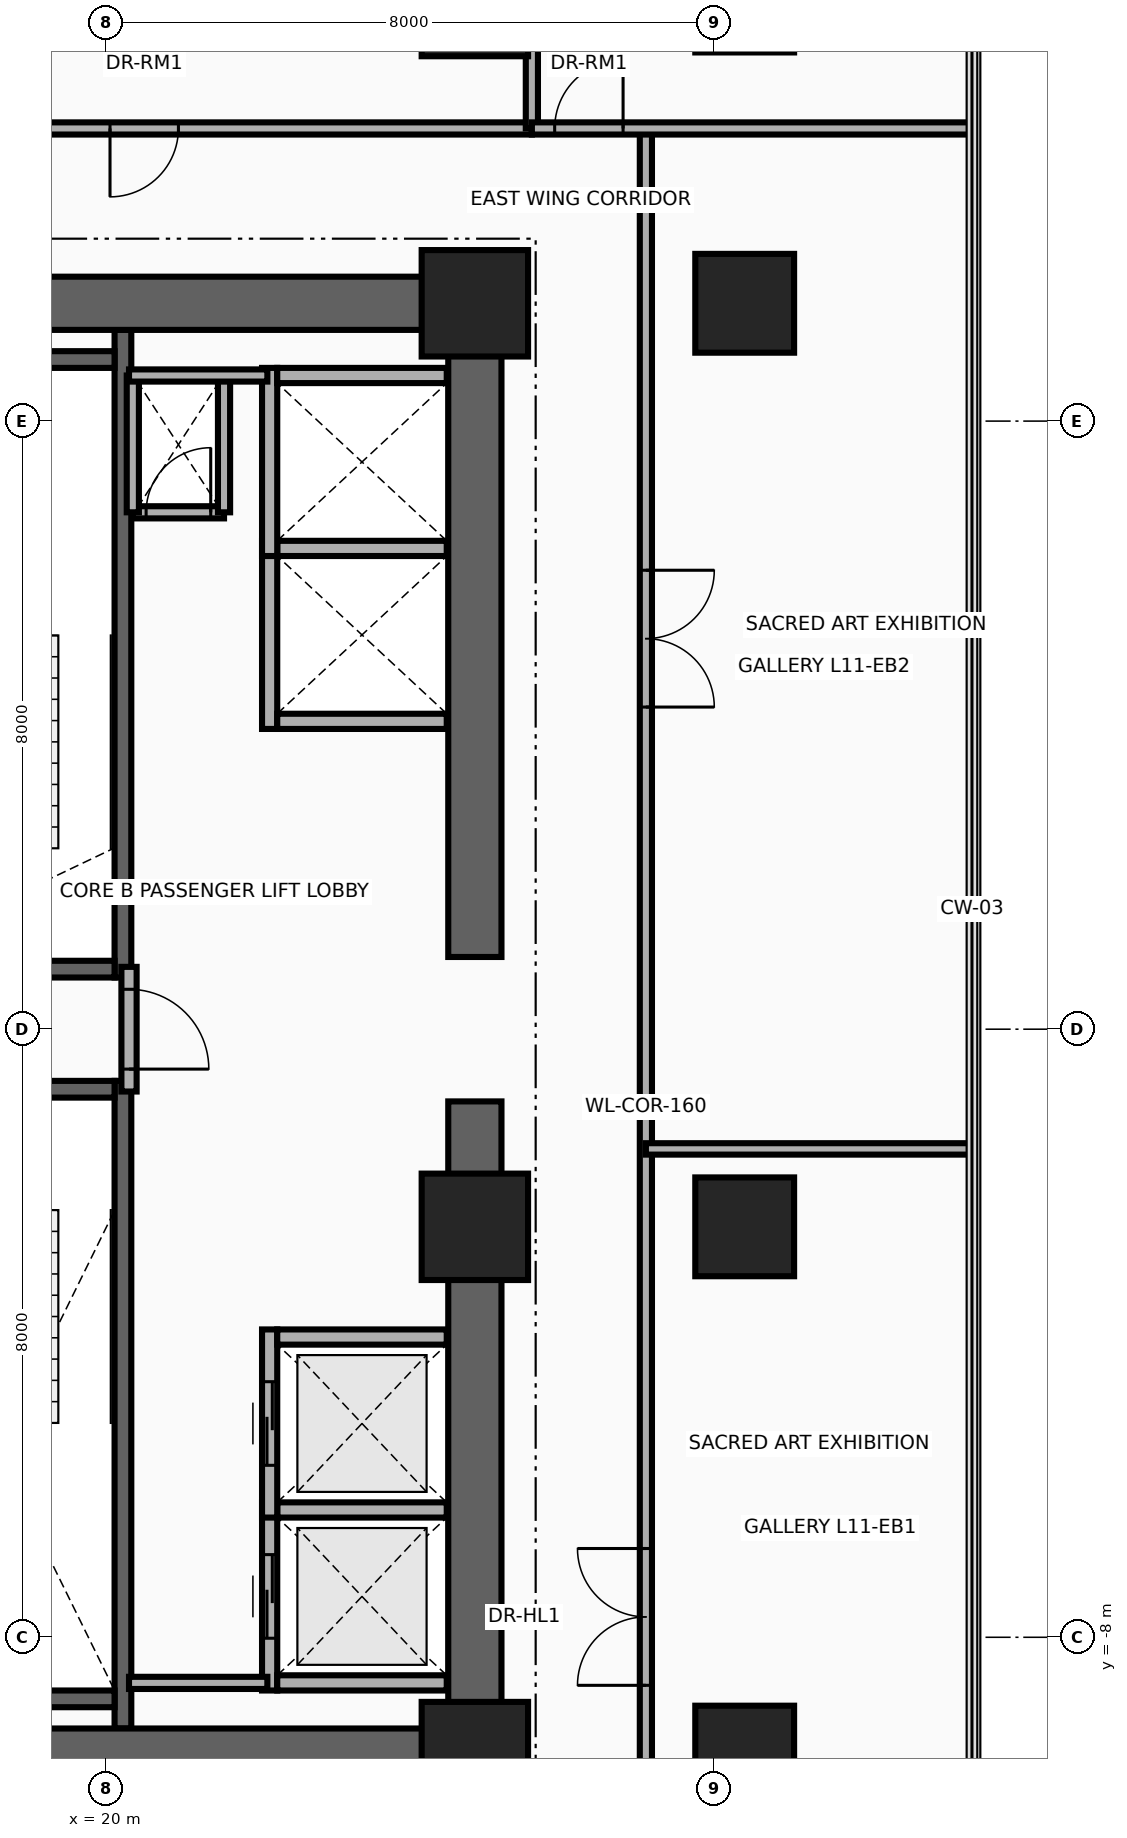
"""IFC4 building model, lengths in metres.
Left out: names, types, materials, properties, quantities, classifications, styles, units other than length and angle.
Written with IfcOpenShell. Run it as: python <this file> out.ifc"""

import sys

from ifc_helpers import new_model, si_unit, direction, frame, frame_2d, origin, origin_2d, place, context, subcontext, project, spatial, rectangle, circle, extrude, source, transform, mapped, element, fill, save


model = new_model("IFC4")
c1 = context("Model", 3, precision=1e-05, world=origin(), true_north=direction((0.0, 1.0)))
c2 = subcontext(c1, "Body", "Model", "MODEL_VIEW")
j1 = project(units=[si_unit("LENGTHUNIT", "METRE"), si_unit("PLANEANGLEUNIT", "RADIAN")], contexts=[c1])
p1 = place(None, origin())
s1 = spatial("IfcSite", under=j1, at=p1, CompositionType="ELEMENT")
p2 = place(p1, origin())
s2 = spatial("IfcBuilding", under=s1, at=p2, CompositionType="ELEMENT")
p3 = place(p2, frame((0.0, 0.0, 48.2)))
s3 = spatial("IfcBuildingStorey", under=s2, at=p3, CompositionType="ELEMENT", Elevation=48.2)
p4 = place(p3, frame((20.22, 0.68, 0.0), z_axis=(0.0, 0.0, 1.0), x_axis=(0.0, 1.0, 0.0)))
e1 = element("IfcWall", 1, at=p4, inside=s3, PredefinedType="SHEAR", context=c2, shape_type="SweptSolid", body=[
    extrude(rectangle(XDim=8.52, YDim=0.22, at=frame_2d((4.26, 0.0))), origin(), (0.0, 0.0, 1.0), 3.46),
])
p5 = place(p3, frame((17.0, 0.79, 0.0), z_axis=(0.0, 0.0, 1.0), x_axis=(1.0, 0.0, 0.0)))
e2 = element("IfcWall", 2, at=p5, inside=s3, PredefinedType="SHEAR", context=c2, shape_type="SweptSolid", body=[
    extrude(rectangle(XDim=3.11, YDim=0.22, at=frame_2d((1.555, 0.0))), origin(), (0.0, 0.0, 1.0), 3.46),
])
p6 = place(p5, frame((0.95, 0.0, 0.0)))
e3 = element("IfcOpeningElement", 3, at=p6, cuts=e2, PredefinedType="OPENING", context=c2, shape_type="SweptSolid", body=[
    extrude(rectangle(XDim=1.1, YDim=2.15, at=frame_2d((0.55, 1.075))), frame((0.0, 0.125, 0.0), z_axis=(0.0, -1.0, 0.0), x_axis=(1.0, 0.0, 0.0)), (0.0, 0.0, 1.0), 0.25),
])
p7 = place(p3, frame((17.0, 8.81, 0.0), z_axis=(0.0, 0.0, 1.0), x_axis=(1.0, 0.0, 0.0)))
e4 = element("IfcWall", 4, at=p7, inside=s3, PredefinedType="SHEAR", context=c2, shape_type="SweptSolid", body=[
    extrude(rectangle(XDim=3.11, YDim=0.22, at=frame_2d((1.555, 0.0))), origin(), (0.0, 0.0, 1.0), 3.46),
])
p8 = place(p3, frame((20.22, -9.2, 0.0), z_axis=(0.0, 0.0, 1.0), x_axis=(0.0, 1.0, 0.0)))
e5 = element("IfcWall", 5, at=p8, inside=s3, PredefinedType="SHEAR", context=c2, shape_type="SweptSolid", body=[
    extrude(rectangle(XDim=8.52, YDim=0.22, at=frame_2d((4.26, 0.0))), origin(), (0.0, 0.0, 1.0), 3.46),
])
p9 = place(p3, frame((17.0, -8.81, 0.0), z_axis=(0.0, 0.0, 1.0), x_axis=(1.0, 0.0, 0.0)))
e6 = element("IfcWall", 6, at=p9, inside=s3, PredefinedType="SHEAR", context=c2, shape_type="SweptSolid", body=[
    extrude(rectangle(XDim=3.11, YDim=0.22, at=frame_2d((1.555, 0.0))), origin(), (0.0, 0.0, 1.0), 3.46),
])
p10 = place(p3, frame((17.0, -0.79, 0.0), z_axis=(0.0, 0.0, 1.0), x_axis=(1.0, 0.0, 0.0)))
e7 = element("IfcWall", 7, at=p10, inside=s3, PredefinedType="SHEAR", context=c2, shape_type="SweptSolid", body=[
    extrude(rectangle(XDim=3.11, YDim=0.22, at=frame_2d((1.555, 0.0))), origin(), (0.0, 0.0, 1.0), 3.46),
])
p11 = place(p10, frame((0.95, 0.0, 0.0)))
e8 = element("IfcOpeningElement", 8, at=p11, cuts=e7, PredefinedType="OPENING", context=c2, shape_type="SweptSolid", body=[
    extrude(rectangle(XDim=1.1, YDim=2.15, at=frame_2d((0.55, 1.075))), frame((0.0, 0.125, 0.0), z_axis=(0.0, -1.0, 0.0), x_axis=(1.0, 0.0, 0.0)), (0.0, 0.0, 1.0), 0.25),
])
for number, where, z_axis, x_axis in (
    (9, (24.85, -9.9, 0.0), (0.0, 0.0, 1.0), (0.0, 1.0, 0.0)),
    (10, (24.85, 0.95, 0.0), (0.0, 0.0, 1.0), (0.0, 1.0, 0.0)),
):
    element("IfcWall", number, at=place(p3, frame(where, z_axis=z_axis, x_axis=x_axis)), inside=s3, PredefinedType="SHEAR", context=c2, shape_type="SweptSolid", body=[
        extrude(rectangle(XDim=8.95, YDim=0.7, at=frame_2d((4.475, 0.0))), origin(), (0.0, 0.0, 1.0), 3.46),
    ])
for number, where, z_axis, x_axis in (
    (11, (15.85, 9.55, 0.0), (0.0, 0.0, 1.0), (1.0, 0.0, 0.0)),
    (12, (15.85, -9.55, 0.0), (0.0, 0.0, 1.0), (1.0, 0.0, 0.0)),
):
    element("IfcWall", number, at=place(p3, frame(where, z_axis=z_axis, x_axis=x_axis)), inside=s3, PredefinedType="SHEAR", context=c2, shape_type="SweptSolid", body=[
        extrude(rectangle(XDim=9.0, YDim=0.7, at=frame_2d((4.5, 0.0))), origin(), (0.0, 0.0, 1.0), 3.46),
    ])
m1 = source(origin(), c2, "Body", "SweptSolid", [
    extrude(rectangle(XDim=1.4, YDim=1.4, at=origin_2d()), origin(), (0.0, 0.0, 1.0), 3.7),
])
p12 = place(p3, frame((24.85, -9.55, 0.0), z_axis=(0.0, 0.0, 1.0), x_axis=(1.0, 0.0, 0.0)))
e13 = element("IfcColumn", 13, at=p12, inside=s3, PredefinedType="COLUMN", context=c2, shape_type="MappedRepresentation", body=[
    mapped(m1, transform((0.0, 0.0, 0.0), x_axis=(1.0, 0.0, 0.0), y_axis=(0.0, 1.0, 0.0), z_axis=(0.0, 0.0, 1.0), scale=1.0)),
])
m2 = source(origin(), c2, "Body", "SweptSolid", [
    extrude(circle(Radius=0.65, at=origin_2d()), origin(), (0.0, 0.0, 1.0), 3.7),
])
p13 = place(p3, frame((28.4, -9.55, 0.0), z_axis=(0.0, 0.0, 1.0), x_axis=(1.0, 0.0, 0.0)))
e14 = element("IfcColumn", 14, at=p13, inside=s3, PredefinedType="COLUMN", context=c2, shape_type="MappedRepresentation", body=[
    mapped(m2, transform((0.0, 0.0, 0.0), x_axis=(1.0, 0.0, 0.0), y_axis=(0.0, 1.0, 0.0), z_axis=(0.0, 0.0, 1.0), scale=1.0)),
])
p14 = place(p3, frame((24.85, -2.6, 0.0), z_axis=(0.0, 0.0, 1.0), x_axis=(1.0, 0.0, 0.0)))
e15 = element("IfcColumn", 15, at=p14, inside=s3, PredefinedType="COLUMN", context=c2, shape_type="MappedRepresentation", body=[
    mapped(m1, transform((0.0, 0.0, 0.0), x_axis=(1.0, 0.0, 0.0), y_axis=(0.0, 1.0, 0.0), z_axis=(0.0, 0.0, 1.0), scale=1.0)),
])
p15 = place(p3, frame((28.4, -2.6, 0.0), z_axis=(0.0, 0.0, 1.0), x_axis=(1.0, 0.0, 0.0)))
e16 = element("IfcColumn", 16, at=p15, inside=s3, PredefinedType="COLUMN", context=c2, shape_type="MappedRepresentation", body=[
    mapped(m2, transform((0.0, 0.0, 0.0), x_axis=(1.0, 0.0, 0.0), y_axis=(0.0, 1.0, 0.0), z_axis=(0.0, 0.0, 1.0), scale=1.0)),
])
p16 = place(p3, frame((24.85, 9.55, 0.0), z_axis=(0.0, 0.0, 1.0), x_axis=(1.0, 0.0, 0.0)))
e17 = element("IfcColumn", 17, at=p16, inside=s3, PredefinedType="COLUMN", context=c2, shape_type="MappedRepresentation", body=[
    mapped(m1, transform((0.0, 0.0, 0.0), x_axis=(1.0, 0.0, 0.0), y_axis=(0.0, 1.0, 0.0), z_axis=(0.0, 0.0, 1.0), scale=1.0)),
])
p17 = place(p3, frame((28.4, 9.55, 0.0), z_axis=(0.0, 0.0, 1.0), x_axis=(1.0, 0.0, 0.0)))
e18 = element("IfcColumn", 18, at=p17, inside=s3, PredefinedType="COLUMN", context=c2, shape_type="MappedRepresentation", body=[
    mapped(m2, transform((0.0, 0.0, 0.0), x_axis=(1.0, 0.0, 0.0), y_axis=(0.0, 1.0, 0.0), z_axis=(0.0, 0.0, 1.0), scale=1.0)),
])
p18 = place(p3, frame((24.85, 13.5, 0.0), z_axis=(0.0, 0.0, 1.0), x_axis=(1.0, 0.0, 0.0)))
e19 = element("IfcColumn", 19, at=p18, inside=s3, PredefinedType="COLUMN", context=c2, shape_type="MappedRepresentation", body=[
    mapped(m1, transform((0.0, 0.0, 0.0), x_axis=(1.0, 0.0, 0.0), y_axis=(0.0, 1.0, 0.0), z_axis=(0.0, 0.0, 1.0), scale=1.0)),
])
p19 = place(p3, frame((22.15, -8.7, 0.0), z_axis=(0.0, 0.0, 1.0), x_axis=(0.0, 1.0, 0.0)))
e20 = element("IfcWall", 20, at=p19, inside=s3, PredefinedType="MOVABLE", context=c2, shape_type="SweptSolid", body=[
    extrude(rectangle(XDim=2.475, YDim=0.2, at=frame_2d((1.237, 0.0))), origin(), (0.0, 0.0, 1.0), 3.46),
])
p20 = place(p19, frame((0.688, 0.0, 0.0)))
e21 = element("IfcOpeningElement", 21, at=p20, cuts=e20, PredefinedType="OPENING", context=c2, shape_type="SweptSolid", body=[
    extrude(rectangle(XDim=1.1, YDim=2.1, at=frame_2d((0.55, 1.05))), frame((0.0, 0.115, 0.0), z_axis=(0.0, -1.0, 0.0), x_axis=(1.0, 0.0, 0.0)), (0.0, 0.0, 1.0), 0.23),
])
for number, where, z_axis, x_axis in (
    (22, (22.25, -8.6, 0.0), (0.0, 0.0, 1.0), (1.0, 0.0, 0.0)),
    (23, (22.25, -6.325, 0.0), (0.0, 0.0, 1.0), (1.0, 0.0, 0.0)),
):
    element("IfcWall", number, at=place(p3, frame(where, z_axis=z_axis, x_axis=x_axis)), inside=s3, PredefinedType="MOVABLE", context=c2, shape_type="SweptSolid", body=[
        extrude(rectangle(XDim=2.23, YDim=0.2, at=frame_2d((1.115, 0.0))), origin(), (0.0, 0.0, 1.0), 3.46),
    ])
p21 = place(p3, frame((22.15, -6.425, 0.0), z_axis=(0.0, 0.0, 1.0), x_axis=(0.0, 1.0, 0.0)))
e24 = element("IfcWall", 24, at=p21, inside=s3, PredefinedType="MOVABLE", context=c2, shape_type="SweptSolid", body=[
    extrude(rectangle(XDim=2.475, YDim=0.2, at=frame_2d((1.238, 0.0))), origin(), (0.0, 0.0, 1.0), 3.46),
])
p22 = place(p21, frame((0.688, 0.0, 0.0)))
e25 = element("IfcOpeningElement", 25, at=p22, cuts=e24, PredefinedType="OPENING", context=c2, shape_type="SweptSolid", body=[
    extrude(rectangle(XDim=1.1, YDim=2.1, at=frame_2d((0.55, 1.05))), frame((0.0, 0.115, 0.0), z_axis=(0.0, -1.0, 0.0), x_axis=(1.0, 0.0, 0.0)), (0.0, 0.0, 1.0), 0.23),
])
p23 = place(p3, frame((22.25, -4.05, 0.0), z_axis=(0.0, 0.0, 1.0), x_axis=(1.0, 0.0, 0.0)))
e26 = element("IfcWall", 26, at=p23, inside=s3, PredefinedType="MOVABLE", context=c2, shape_type="SweptSolid", body=[
    extrude(rectangle(XDim=2.23, YDim=0.2, at=frame_2d((1.115, 0.0))), origin(), (0.0, 0.0, 1.0), 3.46),
])
p24 = place(p3, frame((22.15, 3.95, 0.0), z_axis=(0.0, 0.0, 1.0), x_axis=(0.0, 1.0, 0.0)))
e27 = element("IfcWall", 27, at=p24, inside=s3, PredefinedType="MOVABLE", context=c2, shape_type="SweptSolid", body=[
    extrude(rectangle(XDim=2.475, YDim=0.2, at=frame_2d((1.238, 0.0))), origin(), (0.0, 0.0, 1.0), 3.46),
])
for number, where, z_axis, x_axis in (
    (28, (22.25, 4.05, 0.0), (0.0, 0.0, 1.0), (1.0, 0.0, 0.0)),
    (29, (22.25, 6.325, 0.0), (0.0, 0.0, 1.0), (1.0, 0.0, 0.0)),
):
    element("IfcWall", number, at=place(p3, frame(where, z_axis=z_axis, x_axis=x_axis)), inside=s3, PredefinedType="MOVABLE", context=c2, shape_type="SweptSolid", body=[
        extrude(rectangle(XDim=2.23, YDim=0.2, at=frame_2d((1.115, 0.0))), origin(), (0.0, 0.0, 1.0), 2.245),
    ])
p25 = place(p3, frame((22.15, 6.225, 0.0), z_axis=(0.0, 0.0, 1.0), x_axis=(0.0, 1.0, 0.0)))
e30 = element("IfcWall", 30, at=p25, inside=s3, PredefinedType="MOVABLE", context=c2, shape_type="SweptSolid", body=[
    extrude(rectangle(XDim=2.475, YDim=0.2, at=frame_2d((1.237, 0.0))), origin(), (0.0, 0.0, 1.0), 3.46),
])
p26 = place(p3, frame((22.25, 8.6, 0.0), z_axis=(0.0, 0.0, 1.0), x_axis=(1.0, 0.0, 0.0)))
e31 = element("IfcWall", 31, at=p26, inside=s3, PredefinedType="MOVABLE", context=c2, shape_type="SweptSolid", body=[
    extrude(rectangle(XDim=2.23, YDim=0.2, at=frame_2d((1.115, 0.0))), origin(), (0.0, 0.0, 1.0), 2.245),
])
p27 = place(p3, frame((20.3, -0.82, 0.0), z_axis=(0.0, 0.0, 1.0), x_axis=(0.0, 1.0, 0.0)))
e32 = element("IfcWall", 32, at=p27, inside=s3, PredefinedType="PARTITIONING", context=c2, shape_type="SweptSolid", body=[
    extrude(rectangle(XDim=1.64, YDim=0.2, at=frame_2d((0.82, 0.0))), origin(), (0.0, 0.0, 1.0), 3.46),
])
p28 = place(p27, frame((0.295, 0.0, 0.0)))
e33 = element("IfcOpeningElement", 33, at=p28, cuts=e32, PredefinedType="OPENING", context=c2, shape_type="SweptSolid", body=[
    extrude(rectangle(XDim=1.05, YDim=2.15, at=frame_2d((0.525, 1.075))), frame((0.0, 0.115, 0.0), z_axis=(0.0, -1.0, 0.0), x_axis=(1.0, 0.0, 0.0)), (0.0, 0.0, 1.0), 0.23),
])
p29 = place(p3, frame((20.35, 6.8, 0.0), z_axis=(0.0, 0.0, 1.0), x_axis=(1.0, 0.0, 0.0)))
e34 = element("IfcWall", 34, at=p29, inside=s3, PredefinedType="PARTITIONING", context=c2, shape_type="SweptSolid", body=[
    extrude(rectangle(XDim=1.2, YDim=0.16, at=frame_2d((0.6, 0.0))), origin(), (0.0, 0.0, 1.0), 3.46),
])
p30 = place(p29, frame((0.175, 0.0, 0.0)))
e35 = element("IfcOpeningElement", 35, at=p30, cuts=e34, PredefinedType="OPENING", context=c2, shape_type="SweptSolid", body=[
    extrude(rectangle(XDim=0.85, YDim=2.05, at=frame_2d((0.425, 1.025))), frame((0.0, 0.095, 0.0), z_axis=(0.0, -1.0, 0.0), x_axis=(1.0, 0.0, 0.0)), (0.0, 0.0, 1.0), 0.19),
])
for number, where, z_axis, x_axis in (
    (36, (21.55, 6.8, 0.0), (0.0, 0.0, 1.0), (0.0, 1.0, 0.0)),
    (37, (20.35, 6.8, 0.0), (0.0, 0.0, 1.0), (0.0, 1.0, 0.0)),
):
    element("IfcWall", number, at=place(p3, frame(where, z_axis=z_axis, x_axis=x_axis)), inside=s3, PredefinedType="PARTITIONING", context=c2, shape_type="SweptSolid", body=[
        extrude(rectangle(XDim=1.8, YDim=0.16, at=frame_2d((0.9, 0.0))), origin(), (0.0, 0.0, 1.0), 3.46),
    ])
for number, where, z_axis, x_axis in (
    (38, (20.3, -8.6, 0.0), (0.0, 0.0, 1.0), (1.0, 0.0, 0.0)),
    (39, (20.3, 8.6, 0.0), (0.0, 0.0, 1.0), (1.0, 0.0, 0.0)),
):
    element("IfcWall", number, at=place(p3, frame(where, z_axis=z_axis, x_axis=x_axis)), inside=s3, PredefinedType="PARTITIONING", context=c2, shape_type="SweptSolid", body=[
        extrude(rectangle(XDim=1.82, YDim=0.16, at=frame_2d((0.91, 0.0))), origin(), (0.0, 0.0, 1.0), 3.46),
    ])
p31 = place(p3, frame((15.4, 11.85, 0.0), z_axis=(0.0, 0.0, 1.0), x_axis=(1.0, 0.0, 0.0)))
e40 = element("IfcWall", 40, at=p31, inside=s3, PredefinedType="PARTITIONING", context=c2, shape_type="SweptSolid", body=[
    extrude(rectangle(XDim=10.2, YDim=0.16, at=frame_2d((5.1, 0.0))), origin(), (0.0, 0.0, 1.0), 2.834),
])
p32 = place(p31, frame((4.65, 0.0, 0.0)))
e41 = element("IfcOpeningElement", 41, at=p32, cuts=e40, PredefinedType="OPENING", context=c2, shape_type="SweptSolid", body=[
    extrude(rectangle(XDim=0.9, YDim=2.1, at=frame_2d((0.45, 1.05))), frame((0.0, 0.095, 0.0), z_axis=(0.0, -1.0, 0.0), x_axis=(1.0, 0.0, 0.0)), (0.0, 0.0, 1.0), 0.19),
])
p33 = place(p3, frame((25.6, 11.85, 0.0), z_axis=(0.0, 0.0, 1.0), x_axis=(0.0, 1.0, 0.0)))
e42 = element("IfcWall", 42, at=p33, inside=s3, PredefinedType="PARTITIONING", context=c2, shape_type="SweptSolid", body=[
    extrude(rectangle(XDim=5.898, YDim=0.16, at=frame_2d((2.949, 0.0))), origin(), (0.0, 0.0, 1.0), 2.583),
])
p34 = place(p3, frame((27.1, -13.89, 0.0), z_axis=(0.0, 0.0, 1.0), x_axis=(0.0, 1.0, 0.0)))
e43 = element("IfcWall", 43, at=p34, inside=s3, PredefinedType="PARTITIONING", context=c2, shape_type="SweptSolid", body=[
    extrude(rectangle(XDim=25.74, YDim=0.16, at=frame_2d((12.87, 0.0))), origin(), (0.0, 0.0, 1.0), 2.583),
])
p35 = place(p34, frame((5.258, 0.0, 0.0)))
e44 = element("IfcOpeningElement", 44, at=p35, cuts=e43, PredefinedType="OPENING", context=c2, shape_type="SweptSolid", body=[
    extrude(rectangle(XDim=1.8, YDim=2.15, at=frame_2d((0.9, 1.075))), frame((0.0, 0.095, 0.0), z_axis=(0.0, -1.0, 0.0), x_axis=(1.0, 0.0, 0.0)), (0.0, 0.0, 1.0), 0.19),
])
p36 = place(p34, frame((18.128, 0.0, 0.0)))
e45 = element("IfcOpeningElement", 45, at=p36, cuts=e43, PredefinedType="OPENING", context=c2, shape_type="SweptSolid", body=[
    extrude(rectangle(XDim=1.8, YDim=2.15, at=frame_2d((0.9, 1.075))), frame((0.0, 0.095, 0.0), z_axis=(0.0, -1.0, 0.0), x_axis=(1.0, 0.0, 0.0)), (0.0, 0.0, 1.0), 0.19),
])
p37 = place(p3, frame((25.6, 11.85, 0.0), z_axis=(0.0, 0.0, 1.0), x_axis=(1.0, 0.0, 0.0)))
e46 = element("IfcWall", 46, at=p37, inside=s3, PredefinedType="PARTITIONING", context=c2, shape_type="SweptSolid", body=[
    extrude(rectangle(XDim=5.79, YDim=0.16, at=frame_2d((2.895, 0.0))), origin(), (0.0, 0.0, 1.0), 2.896),
])
p38 = place(p37, frame((0.3, 0.0, 0.0)))
e47 = element("IfcOpeningElement", 47, at=p38, cuts=e46, PredefinedType="OPENING", context=c2, shape_type="SweptSolid", body=[
    extrude(rectangle(XDim=0.9, YDim=2.1, at=frame_2d((0.45, 1.05))), frame((0.0, 0.095, 0.0), z_axis=(0.0, -1.0, 0.0), x_axis=(1.0, 0.0, 0.0)), (0.0, 0.0, 1.0), 0.19),
])
p39 = place(p3, frame((27.1, -1.575, 0.0), z_axis=(0.0, 0.0, 1.0), x_axis=(1.0, 0.0, 0.0)))
e48 = element("IfcWall", 48, at=p39, inside=s3, PredefinedType="PARTITIONING", context=c2, shape_type="SweptSolid", body=[
    extrude(rectangle(XDim=4.29, YDim=0.15, at=frame_2d((2.145, 0.0))), origin(), (0.0, 0.0, 1.0), 2.896),
])
p40 = place(p20, origin())
e49 = element("IfcDoor", 49, at=p40, inside=s3, OperationType="DOUBLE_DOOR_SLIDING", PredefinedType="DOOR", context=c2, shape_type="SweptSolid", body=[
    extrude(rectangle(XDim=1.1, YDim=2.1, at=frame_2d((0.55, 1.05))), frame((0.0, 0.025, 0.0), z_axis=(0.0, -1.0, 0.0), x_axis=(1.0, 0.0, 0.0)), (0.0, 0.0, 1.0), 0.05),
])
fill(e21, e49)
p41 = place(p22, origin())
e50 = element("IfcDoor", 50, at=p41, inside=s3, OperationType="DOUBLE_DOOR_SLIDING", PredefinedType="DOOR", context=c2, shape_type="SweptSolid", body=[
    extrude(rectangle(XDim=1.1, YDim=2.1, at=frame_2d((0.55, 1.05))), frame((0.0, 0.025, 0.0), z_axis=(0.0, -1.0, 0.0), x_axis=(1.0, 0.0, 0.0)), (0.0, 0.0, 1.0), 0.05),
])
fill(e25, e50)
p42 = place(p28, frame((1.05, 0.0, 0.0), z_axis=(0.0, 0.0, 1.0), x_axis=(-1.0, 0.0, 0.0)))
e51 = element("IfcDoor", 51, at=p42, inside=s3, OperationType="SINGLE_SWING_LEFT", PredefinedType="DOOR", context=c2, shape_type="SweptSolid", body=[
    extrude(rectangle(XDim=1.05, YDim=2.15, at=frame_2d((0.525, 1.075))), frame((0.0, 0.025, 0.0), z_axis=(0.0, -1.0, 0.0), x_axis=(1.0, 0.0, 0.0)), (0.0, 0.0, 1.0), 0.05),
])
fill(e33, e51)
p43 = place(p30, origin())
e52 = element("IfcDoor", 52, at=p43, inside=s3, OperationType="SINGLE_SWING_RIGHT", PredefinedType="DOOR", context=c2, shape_type="SweptSolid", body=[
    extrude(rectangle(XDim=0.85, YDim=2.05, at=frame_2d((0.425, 1.025))), frame((0.0, 0.025, 0.0), z_axis=(0.0, -1.0, 0.0), x_axis=(1.0, 0.0, 0.0)), (0.0, 0.0, 1.0), 0.05),
])
fill(e35, e52)
p44 = place(p32, frame((0.9, 0.0, 0.0), z_axis=(0.0, 0.0, 1.0), x_axis=(-1.0, 0.0, 0.0)))
e53 = element("IfcDoor", 53, at=p44, inside=s3, OperationType="SINGLE_SWING_LEFT", PredefinedType="DOOR", context=c2, shape_type="SweptSolid", body=[
    extrude(rectangle(XDim=0.9, YDim=2.1, at=frame_2d((0.45, 1.05))), frame((0.0, 0.025, 0.0), z_axis=(0.0, -1.0, 0.0), x_axis=(1.0, 0.0, 0.0)), (0.0, 0.0, 1.0), 0.05),
])
fill(e41, e53)
p45 = place(p38, origin())
e54 = element("IfcDoor", 54, at=p45, inside=s3, OperationType="SINGLE_SWING_LEFT", PredefinedType="DOOR", context=c2, shape_type="SweptSolid", body=[
    extrude(rectangle(XDim=0.9, YDim=2.1, at=frame_2d((0.45, 1.05))), frame((0.0, 0.025, 0.0), z_axis=(0.0, -1.0, 0.0), x_axis=(1.0, 0.0, 0.0)), (0.0, 0.0, 1.0), 0.05),
])
fill(e47, e54)
p46 = place(p35, origin())
e55 = element("IfcDoor", 55, at=p46, inside=s3, OperationType="DOUBLE_DOOR_SINGLE_SWING", PredefinedType="DOOR", context=c2, shape_type="SweptSolid", body=[
    extrude(rectangle(XDim=1.8, YDim=2.15, at=frame_2d((0.9, 1.075))), frame((0.0, 0.025, 0.0), z_axis=(0.0, -1.0, 0.0), x_axis=(1.0, 0.0, 0.0)), (0.0, 0.0, 1.0), 0.05),
])
fill(e44, e55)
p47 = place(p36, frame((1.8, 0.0, 0.0), z_axis=(0.0, 0.0, 1.0), x_axis=(-1.0, 0.0, 0.0)))
e56 = element("IfcDoor", 56, at=p47, inside=s3, OperationType="DOUBLE_DOOR_SINGLE_SWING", PredefinedType="DOOR", context=c2, shape_type="SweptSolid", body=[
    extrude(rectangle(XDim=1.8, YDim=2.15, at=frame_2d((0.9, 1.075))), frame((0.0, 0.025, 0.0), z_axis=(0.0, -1.0, 0.0), x_axis=(1.0, 0.0, 0.0)), (0.0, 0.0, 1.0), 0.05),
])
fill(e45, e56)
save(model, sys.argv[1])
